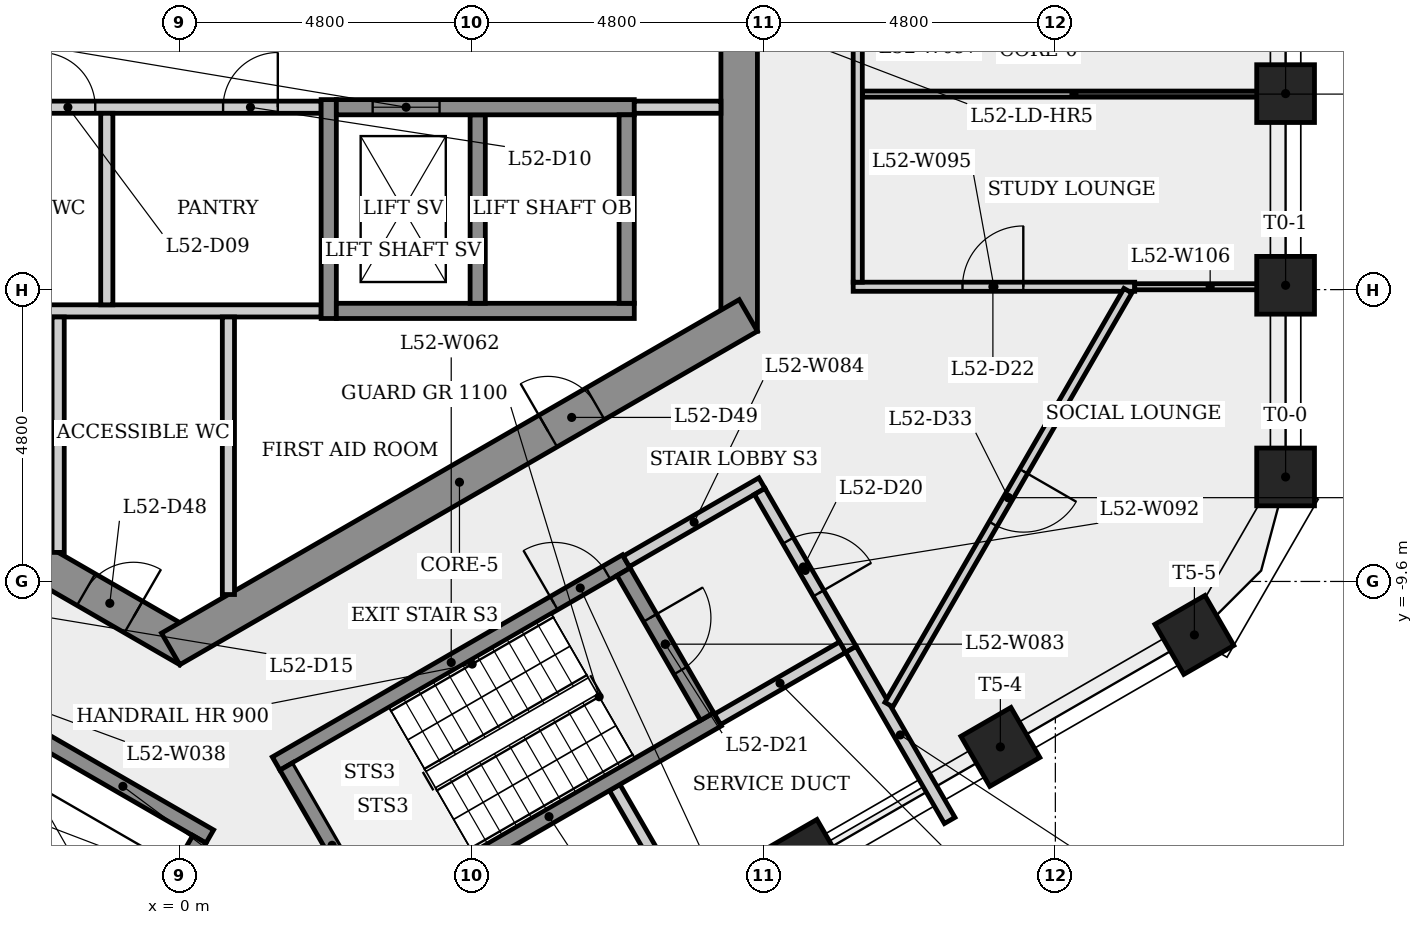
"""IFC4 building model, lengths in metres.
Left out: names, types, materials, properties, quantities, classifications, styles, units other than length and angle.
Written with IfcOpenShell. Run it as: python <this file> out.ifc"""

import sys

from ifc_helpers import new_model, si_unit, direction, frame, frame_2d, origin, origin_2d, place, context, subcontext, project, spatial, rectangle, extrude, element, fill, save


model = new_model("IFC4")
c1 = context("Model", 3, precision=1e-05, world=origin(), true_north=direction((0.0, 1.0)))
c2 = subcontext(c1, "Body", "Model", "MODEL_VIEW")
j1 = project(units=[si_unit("LENGTHUNIT", "METRE"), si_unit("PLANEANGLEUNIT", "RADIAN")], contexts=[c1])
p1 = place(None, origin())
s1 = spatial("IfcSite", under=j1, at=p1, CompositionType="ELEMENT")
p2 = place(p1, origin())
s2 = spatial("IfcBuilding", under=s1, at=p2, CompositionType="ELEMENT")
p3 = place(p2, frame((0.0, 0.0, 194.7)))
s3 = spatial("IfcBuildingStorey", under=s2, at=p3, CompositionType="ELEMENT", Elevation=194.7)
p4 = place(p3, frame((9.2, -5.485, 0.0), z_axis=(0.0, 0.0, 1.0), x_axis=(0.0, 1.0, 0.0)))
e1 = element("IfcWall", 1, at=p4, inside=s3, PredefinedType="SHEAR", context=c2, shape_type="SweptSolid", body=[
    extrude(rectangle(XDim=10.97, YDim=0.6, at=frame_2d((5.485, 0.0))), origin(), (0.0, 0.0, 1.0), 4.0),
])
p5 = place(p4, frame((4.685, 0.0, 0.0)))
e2 = element("IfcOpeningElement", 2, at=p5, cuts=e1, PredefinedType="OPENING", context=c2, shape_type="SweptSolid", body=[
    extrude(rectangle(XDim=1.6, YDim=2.1, at=frame_2d((0.8, 1.05))), frame((0.0, 0.31, 0.0), z_axis=(0.0, -1.0, 0.0), x_axis=(1.0, 0.0, 0.0)), (0.0, 0.0, 1.0), 0.62),
])
p6 = place(p3, frame((-9.35, -5.225, 0.0), z_axis=(0.0, 0.0, 1.0), x_axis=(0.866023993627, -0.500002442456, 0.0)))
e3 = element("IfcWall", 3, at=p6, inside=s3, PredefinedType="SHEAR", context=c2, shape_type="SweptSolid", body=[
    extrude(rectangle(XDim=10.97, YDim=0.6, at=frame_2d((5.485, 0.0))), origin(), (0.0, 0.0, 1.0), 4.0),
])
p7 = place(p6, frame((3.891, 0.0, 0.0)))
e4 = element("IfcOpeningElement", 4, at=p7, cuts=e3, PredefinedType="OPENING", context=c2, shape_type="SweptSolid", body=[
    extrude(rectangle(XDim=0.9, YDim=2.1, at=frame_2d((0.45, 1.05))), frame((0.0, 0.31, 0.0), z_axis=(0.0, -1.0, 0.0), x_axis=(1.0, 0.0, 0.0)), (0.0, 0.0, 1.0), 0.62),
])
p8 = place(p6, frame((9.018, 0.0, 0.0)))
e5 = element("IfcOpeningElement", 5, at=p8, cuts=e3, PredefinedType="OPENING", context=c2, shape_type="SweptSolid", body=[
    extrude(rectangle(XDim=0.9, YDim=2.1, at=frame_2d((0.45, 1.05))), frame((0.0, 0.31, 0.0), z_axis=(0.0, -1.0, 0.0), x_axis=(1.0, 0.0, 0.0)), (0.0, 0.0, 1.0), 0.62),
])
p9 = place(p3, frame((-0.15, -10.71, 0.0), z_axis=(0.0, 0.0, 1.0), x_axis=(0.866023993627, 0.500002442456, 0.0)))
e6 = element("IfcWall", 6, at=p9, inside=s3, PredefinedType="SHEAR", context=c2, shape_type="SweptSolid", body=[
    extrude(rectangle(XDim=10.97, YDim=0.6, at=frame_2d((5.485, 0.0))), origin(), (0.0, 0.0, 1.0), 4.0),
])
p10 = place(p9, frame((7.166, 0.0, 0.0)))
e7 = element("IfcOpeningElement", 7, at=p10, cuts=e6, PredefinedType="OPENING", context=c2, shape_type="SweptSolid", body=[
    extrude(rectangle(XDim=0.9, YDim=2.1, at=frame_2d((0.45, 1.05))), frame((0.0, 0.31, 0.0), z_axis=(0.0, -1.0, 0.0), x_axis=(1.0, 0.0, 0.0)), (0.0, 0.0, 1.0), 0.62),
])
for number, where, z_axis, x_axis in (
    (8, (18.187, -7.881, 0.0), (0.0, 0.0, 1.0), (1.0, 0.0, 0.0)),
    (9, (18.187, -4.729, 0.0), (0.0, 0.0, 1.0), (1.0, 0.0, 0.0)),
    (10, (18.187, -1.576, 0.0), (0.0, 0.0, 1.0), (1.0, 0.0, 0.0)),
    (11, (10.305, -14.164, 0.0), (0.0, 0.0, 1.0), (0.5, -0.866, 0.0)),
    (12, (13.496, -12.322, 0.0), (0.0, 0.0, 1.0), (0.5, -0.866, 0.0)),
    (13, (16.687, -10.479, 0.0), (0.0, 0.0, 1.0), (0.5, -0.866, 0.0)),
):
    element("IfcColumn", number, at=place(p3, frame(where, z_axis=z_axis, x_axis=x_axis)), inside=s3, PredefinedType="COLUMN", context=c2, shape_type="SweptSolid", body=[
        extrude(rectangle(XDim=0.95, YDim=0.95, at=origin_2d()), origin(), (0.0, 0.0, 1.0), 4.0),
    ])
p11 = place(p3, frame((-8.88, -5.15, 0.0), z_axis=(0.0, 0.0, 1.0), x_axis=(1.0, 0.0, 0.0)))
e14 = element("IfcWall", 14, at=p11, inside=s3, PredefinedType="PARTITIONING", context=c2, shape_type="SweptSolid", body=[
    extrude(rectangle(XDim=11.205, YDim=0.2, at=frame_2d((5.603, 0.0))), origin(), (0.0, 0.0, 1.0), 3.65),
])
p12 = place(p3, frame((-8.9, -1.8, 0.0), z_axis=(0.0, 0.0, 1.0), x_axis=(1.0, 0.0, 0.0)))
e15 = element("IfcWall", 15, at=p12, inside=s3, PredefinedType="PARTITIONING", context=c2, shape_type="SweptSolid", body=[
    extrude(rectangle(XDim=11.225, YDim=0.2, at=frame_2d((5.613, 0.0))), origin(), (0.0, 0.0, 1.0), 3.65),
])
p13 = place(p12, frame((2.16, 0.0, 0.0)))
e16 = element("IfcOpeningElement", 16, at=p13, cuts=e15, PredefinedType="OPENING", context=c2, shape_type="SweptSolid", body=[
    extrude(rectangle(XDim=0.9, YDim=2.1, at=frame_2d((0.45, 1.05))), frame((0.0, 0.11, 0.0), z_axis=(0.0, -1.0, 0.0), x_axis=(1.0, 0.0, 0.0)), (0.0, 0.0, 1.0), 0.22),
])
p14 = place(p12, frame((6.61, 0.0, 0.0)))
e17 = element("IfcOpeningElement", 17, at=p14, cuts=e15, PredefinedType="OPENING", context=c2, shape_type="SweptSolid", body=[
    extrude(rectangle(XDim=0.9, YDim=2.1, at=frame_2d((0.45, 1.05))), frame((0.0, 0.11, 0.0), z_axis=(0.0, -1.0, 0.0), x_axis=(1.0, 0.0, 0.0)), (0.0, 0.0, 1.0), 0.22),
])
p15 = place(p12, frame((9.613, 0.0, 0.0)))
e18 = element("IfcOpeningElement", 18, at=p15, cuts=e15, PredefinedType="OPENING", context=c2, shape_type="SweptSolid", body=[
    extrude(rectangle(XDim=0.9, YDim=2.1, at=frame_2d((0.45, 1.05))), frame((0.0, 0.11, 0.0), z_axis=(0.0, -1.0, 0.0), x_axis=(1.0, 0.0, 0.0)), (0.0, 0.0, 1.0), 0.22),
])
p16 = place(p3, frame((-2.364, -12.145, 0.0), z_axis=(0.0, 0.0, 1.0), x_axis=(0.866040211805, -0.499974350878, 0.0)))
e19 = element("IfcWall", 19, at=p16, inside=s3, PredefinedType="SHEAR", context=c2, shape_type="SweptSolid", body=[
    extrude(rectangle(XDim=3.3, YDim=0.25, at=frame_2d((1.65, 0.0))), origin(), (0.0, 0.0, 1.0), 3.65),
])
p17 = place(p3, frame((-2.0, -5.25, 0.0), z_axis=(0.0, 0.0, 1.0), x_axis=(0.0, -1.0, 0.0)))
e20 = element("IfcWall", 20, at=p17, inside=s3, PredefinedType="PARTITIONING", context=c2, shape_type="SweptSolid", body=[
    extrude(rectangle(XDim=3.872, YDim=0.2, at=frame_2d((1.936, 0.0))), origin(), (0.0, 0.0, 1.0), 3.65),
])
p18 = place(p3, frame((-1.2, -1.9, 0.0), z_axis=(0.0, 0.0, 1.0), x_axis=(0.0, -1.0, 0.0)))
e21 = element("IfcWall", 21, at=p18, inside=s3, PredefinedType="PARTITIONING", context=c2, shape_type="SweptSolid", body=[
    extrude(rectangle(XDim=3.15, YDim=0.2, at=frame_2d((1.575, 0.0))), origin(), (0.0, 0.0, 1.0), 3.65),
])
p19 = place(p3, frame((0.323, -13.841, 0.0), z_axis=(0.0, 0.0, 1.0), x_axis=(-0.500033620833, -0.866005991917, 0.0)))
e22 = element("IfcWall", 22, at=p19, inside=s3, PredefinedType="SHEAR", context=c2, shape_type="SweptSolid", body=[
    extrude(rectangle(XDim=2.468, YDim=0.25, at=frame_2d((1.234, 0.0))), origin(), (0.0, 0.0, 1.0), 4.0),
])
p20 = place(p3, frame((0.8, -5.25, 0.0), z_axis=(0.0, 0.0, 1.0), x_axis=(0.0, -1.0, 0.0)))
e23 = element("IfcWall", 23, at=p20, inside=s3, PredefinedType="PARTITIONING", context=c2, shape_type="SweptSolid", body=[
    extrude(rectangle(XDim=4.565, YDim=0.2, at=frame_2d((2.282, 0.0))), origin(), (0.0, 0.0, 1.0), 3.65),
])
p21 = place(p3, frame((1.585, -12.595, 0.0), z_axis=(0.0, 0.0, 1.0), x_axis=(0.866036417653, 0.499980922934, 0.0)))
e24 = element("IfcWall", 24, at=p21, inside=s3, PredefinedType="SHEAR", context=c2, shape_type="SweptSolid", body=[
    extrude(rectangle(XDim=6.65, YDim=0.25, at=frame_2d((3.325, 0.0))), origin(), (0.0, 0.0, 1.0), 3.65),
])
p22 = place(p21, frame((5.275, 0.0, 0.0)))
e25 = element("IfcOpeningElement", 25, at=p22, cuts=e24, PredefinedType="OPENING", context=c2, shape_type="SweptSolid", body=[
    extrude(rectangle(XDim=1.0, YDim=2.1, at=frame_2d((0.5, 1.05))), frame((0.0, 0.135, 0.0), z_axis=(0.0, -1.0, 0.0), x_axis=(1.0, 0.0, 0.0)), (0.0, 0.0, 1.0), 0.27),
])
p23 = place(p3, frame((2.45, -5.275, 0.0), z_axis=(0.0, 0.0, 1.0), x_axis=(0.0, 1.0, 0.0)))
e26 = element("IfcWall", 26, at=p23, inside=s3, PredefinedType="SHEAR", context=c2, shape_type="SweptSolid", body=[
    extrude(rectangle(XDim=3.6, YDim=0.25, at=frame_2d((1.8, 0.0))), origin(), (0.0, 0.0, 1.0), 3.65),
])
p24 = place(p3, frame((3.256, -15.239, 0.0), z_axis=(0.0, 0.0, 1.0), x_axis=(-0.50002537861, 0.866010750942, 0.0)))
e27 = element("IfcWall", 27, at=p24, inside=s3, PredefinedType="SHEAR", context=c2, shape_type="SweptSolid", body=[
    extrude(rectangle(XDim=3.0, YDim=0.25, at=frame_2d((1.5, 0.0))), origin(), (0.0, 0.0, 1.0), 3.65),
])
p25 = place(p3, frame((2.575, -5.15, 0.0), z_axis=(0.0, 0.0, 1.0), x_axis=(1.0, 0.0, 0.0)))
e28 = element("IfcWall", 28, at=p25, inside=s3, PredefinedType="SHEAR", context=c2, shape_type="SweptSolid", body=[
    extrude(rectangle(XDim=4.9, YDim=0.25, at=frame_2d((2.45, 0.0))), origin(), (0.0, 0.0, 1.0), 3.65),
])
p26 = place(p3, frame((4.9, -1.925, 0.0), z_axis=(0.0, 0.0, 1.0), x_axis=(0.0, -1.0, 0.0)))
e29 = element("IfcWall", 29, at=p26, inside=s3, PredefinedType="SHEAR", context=c2, shape_type="SweptSolid", body=[
    extrude(rectangle(XDim=3.1, YDim=0.25, at=frame_2d((1.55, 0.0))), origin(), (0.0, 0.0, 1.0), 4.0),
])
p27 = place(p3, frame((2.575, -1.8, 0.0), z_axis=(0.0, 0.0, 1.0), x_axis=(1.0, 0.0, 0.0)))
e30 = element("IfcWall", 30, at=p27, inside=s3, PredefinedType="SHEAR", context=c2, shape_type="SweptSolid", body=[
    extrude(rectangle(XDim=4.9, YDim=0.25, at=frame_2d((2.45, 0.0))), origin(), (0.0, 0.0, 1.0), 3.65),
])
p28 = place(p27, frame((0.597, 0.0, 0.0)))
e31 = element("IfcOpeningElement", 31, at=p28, cuts=e30, PredefinedType="OPENING", context=c2, shape_type="SweptSolid", body=[
    extrude(rectangle(XDim=1.1, YDim=2.1, at=frame_2d((0.55, 1.05))), frame((0.0, 0.135, 0.0), z_axis=(0.0, -1.0, 0.0), x_axis=(1.0, 0.0, 0.0)), (0.0, 0.0, 1.0), 0.27),
])
p29 = place(p3, frame((7.153, -12.989, 0.0), z_axis=(0.0, 0.0, 1.0), x_axis=(0.500015196914, -0.866016629664, 0.0)))
e32 = element("IfcWall", 32, at=p29, inside=s3, PredefinedType="PLUMBINGWALL", context=c2, shape_type="SweptSolid", body=[
    extrude(rectangle(XDim=3.225, YDim=0.2, at=frame_2d((1.612, 0.0))), origin(), (0.0, 0.0, 1.0), 3.65),
])
p30 = place(p3, frame((3.301, -15.068, 0.0), z_axis=(0.0, 0.0, 1.0), x_axis=(0.866035036182, 0.499983315828, 0.0)))
e33 = element("IfcWall", 33, at=p30, inside=s3, PredefinedType="SHEAR", context=c2, shape_type="SweptSolid", body=[
    extrude(rectangle(XDim=6.4, YDim=0.25, at=frame_2d((3.2, 0.0))), origin(), (0.0, 0.0, 1.0), 3.65),
])
p31 = place(p3, frame((7.298, -9.441, 0.0), z_axis=(0.0, 0.0, 1.0), x_axis=(0.500034990121, -0.866005201286, 0.0)))
e34 = element("IfcWall", 34, at=p31, inside=s3, PredefinedType="SHEAR", context=c2, shape_type="SweptSolid", body=[
    extrude(rectangle(XDim=2.75, YDim=0.25, at=frame_2d((1.375, 0.0))), origin(), (0.0, 0.0, 1.0), 3.65),
])
p32 = place(p31, frame((0.875, 0.0, 0.0)))
e35 = element("IfcOpeningElement", 35, at=p32, cuts=e34, PredefinedType="OPENING", context=c2, shape_type="SweptSolid", body=[
    extrude(rectangle(XDim=1.0, YDim=2.1, at=frame_2d((0.5, 1.05))), frame((0.0, 0.135, 0.0), z_axis=(0.0, -1.0, 0.0), x_axis=(1.0, 0.0, 0.0)), (0.0, 0.0, 1.0), 0.27),
])
p33 = place(p3, frame((7.344, -9.27, 0.0), z_axis=(0.0, 0.0, 1.0), x_axis=(0.866005588531, 0.500034319456, 0.0)))
e36 = element("IfcWall", 36, at=p33, inside=s3, PredefinedType="PARTITIONING", context=c2, shape_type="SweptSolid", body=[
    extrude(rectangle(XDim=2.575, YDim=0.2, at=frame_2d((1.288, 0.0))), origin(), (0.0, 0.0, 1.0), 3.65),
])
p34 = place(p3, frame((7.35, -1.925, 0.0), z_axis=(0.0, 0.0, 1.0), x_axis=(0.0, -1.0, 0.0)))
e37 = element("IfcWall", 37, at=p34, inside=s3, PredefinedType="SHEAR", context=c2, shape_type="SweptSolid", body=[
    extrude(rectangle(XDim=3.1, YDim=0.25, at=frame_2d((1.55, 0.0))), origin(), (0.0, 0.0, 1.0), 4.0),
])
p35 = place(p3, frame((8.9, -1.8, 0.0), z_axis=(0.0, 0.0, 1.0), x_axis=(-1.0, 0.0, 0.0)))
e38 = element("IfcWall", 38, at=p35, inside=s3, PredefinedType="PARTITIONING", context=c2, shape_type="SweptSolid", body=[
    extrude(rectangle(XDim=1.425, YDim=0.2, at=frame_2d((0.712, 0.0))), origin(), (0.0, 0.0, 1.0), 3.65),
])
p36 = place(p3, frame((9.537, -8.119, 0.0), z_axis=(0.0, 0.0, 1.0), x_axis=(0.499990139034, -0.866031096941, 0.0)))
e39 = element("IfcWall", 39, at=p36, inside=s3, PredefinedType="PARTITIONING", context=c2, shape_type="SweptSolid", body=[
    extrude(rectangle(XDim=3.0, YDim=0.2, at=frame_2d((1.5, 0.0))), origin(), (0.0, 0.0, 1.0), 3.65),
])
p37 = place(p36, frame((0.935, 0.0, 0.0)))
e40 = element("IfcOpeningElement", 40, at=p37, cuts=e39, PredefinedType="OPENING", context=c2, shape_type="SweptSolid", body=[
    extrude(rectangle(XDim=1.0, YDim=2.1, at=frame_2d((0.5, 1.05))), frame((0.0, 0.11, 0.0), z_axis=(0.0, -1.0, 0.0), x_axis=(1.0, 0.0, 0.0)), (0.0, 0.0, 1.0), 0.22),
])
p38 = place(p3, frame((10.901, -10.681, 0.0), z_axis=(0.0, 0.0, 1.0), x_axis=(-0.866007538022, -0.500030943131, 0.0)))
e41 = element("IfcWall", 41, at=p38, inside=s3, PredefinedType="PLUMBINGWALL", context=c2, shape_type="SweptSolid", body=[
    extrude(rectangle(XDim=2.375, YDim=0.2, at=frame_2d((1.188, 0.0))), origin(), (0.0, 0.0, 1.0), 3.65),
])
p39 = place(p3, frame((11.037, -10.717, 0.0), z_axis=(0.0, 0.0, 1.0), x_axis=(0.500025966412, -0.86601041155, 0.0)))
e42 = element("IfcWall", 42, at=p39, inside=s3, PredefinedType="PLUMBINGWALL", context=c2, shape_type="SweptSolid", body=[
    extrude(rectangle(XDim=3.249, YDim=0.2, at=frame_2d((1.625, 0.0))), origin(), (0.0, 0.0, 1.0), 3.65),
])
p40 = place(p3, frame((11.075, -4.753, 0.0), z_axis=(0.0, 0.0, 1.0), x_axis=(1.0, 0.0, 0.0)))
e43 = element("IfcWall", 43, at=p40, inside=s3, PredefinedType="PARTITIONING", context=c2, shape_type="SweptSolid", body=[
    extrude(rectangle(XDim=4.63, YDim=0.15, at=frame_2d((2.315, 0.0))), origin(), (0.0, 0.0, 1.0), 3.65),
])
p41 = place(p40, frame((1.798, 0.0, 0.0)))
e44 = element("IfcOpeningElement", 44, at=p41, cuts=e43, PredefinedType="OPENING", context=c2, shape_type="SweptSolid", body=[
    extrude(rectangle(XDim=1.0, YDim=2.1, at=frame_2d((0.5, 1.05))), frame((0.0, 0.085, 0.0), z_axis=(0.0, -1.0, 0.0), x_axis=(1.0, 0.0, 0.0)), (0.0, 0.0, 1.0), 0.17),
])
p42 = place(p3, frame((11.225, -1.584, 0.0), z_axis=(0.0, 0.0, 1.0), x_axis=(1.0, 0.0, 0.0)))
e45 = element("IfcWall", 45, at=p42, inside=s3, PredefinedType="PARTITIONING", context=c2, shape_type="SweptSolid", body=[
    extrude(rectangle(XDim=6.961, YDim=0.1, at=frame_2d((3.481, 0.0))), origin(), (0.0, 0.0, 1.0), 3.65),
])
p43 = place(p3, frame((11.15, -4.678, 0.0), z_axis=(0.0, 0.0, 1.0), x_axis=(0.0, 1.0, 0.0)))
e46 = element("IfcWall", 46, at=p43, inside=s3, PredefinedType="PARTITIONING", context=c2, shape_type="SweptSolid", body=[
    extrude(rectangle(XDim=9.506, YDim=0.15, at=frame_2d((4.753, 0.0))), origin(), (0.0, 0.0, 1.0), 3.65),
])
p44 = place(p43, frame((4.178, 0.0, 0.0)))
e47 = element("IfcOpeningElement", 47, at=p44, cuts=e46, PredefinedType="OPENING", context=c2, shape_type="SweptSolid", body=[
    extrude(rectangle(XDim=1.0, YDim=2.1, at=frame_2d((0.5, 1.05))), frame((0.0, 0.085, 0.0), z_axis=(0.0, -1.0, 0.0), x_axis=(1.0, 0.0, 0.0)), (0.0, 0.0, 1.0), 0.17),
])
p45 = place(p3, frame((15.593, -4.818, 0.0), z_axis=(0.0, 0.0, 1.0), x_axis=(-0.500000242082, -0.866025264018, 0.0)))
e48 = element("IfcWall", 48, at=p45, inside=s3, PredefinedType="PARTITIONING", context=c2, shape_type="SweptSolid", body=[
    extrude(rectangle(XDim=7.861, YDim=0.15, at=frame_2d((3.931, 0.0))), origin(), (0.0, 0.0, 1.0), 3.65),
])
p46 = place(p45, frame((3.431, 0.0, 0.0)))
e49 = element("IfcOpeningElement", 49, at=p46, cuts=e48, PredefinedType="OPENING", context=c2, shape_type="SweptSolid", body=[
    extrude(rectangle(XDim=1.0, YDim=2.1, at=frame_2d((0.5, 1.05))), frame((0.0, 0.085, 0.0), z_axis=(0.0, -1.0, 0.0), x_axis=(1.0, 0.0, 0.0)), (0.0, 0.0, 1.0), 0.17),
])
p47 = place(p3, frame((18.187, -4.753, 0.0), z_axis=(0.0, 0.0, 1.0), x_axis=(-1.0, 0.0, 0.0)))
e50 = element("IfcWall", 50, at=p47, inside=s3, PredefinedType="PARTITIONING", context=c2, shape_type="SweptSolid", body=[
    extrude(rectangle(XDim=2.481, YDim=0.1, at=frame_2d((1.241, 0.0))), origin(), (0.0, 0.0, 1.0), 3.65),
])
p48 = place(p28, origin())
e51 = element("IfcDoor", 51, at=p48, inside=s3, OperationType="SLIDING_TO_LEFT", PredefinedType="DOOR", context=c2, shape_type="SweptSolid", body=[
    extrude(rectangle(XDim=1.1, YDim=2.1, at=frame_2d((0.55, 1.05))), frame((0.0, 0.025, 0.0), z_axis=(0.0, -1.0, 0.0), x_axis=(1.0, 0.0, 0.0)), (0.0, 0.0, 1.0), 0.05),
])
fill(e31, e51)
p49 = place(p14, origin())
e52 = element("IfcDoor", 52, at=p49, inside=s3, OperationType="SINGLE_SWING_LEFT", PredefinedType="DOOR", context=c2, shape_type="SweptSolid", body=[
    extrude(rectangle(XDim=0.9, YDim=2.1, at=frame_2d((0.45, 1.05))), frame((0.0, 0.025, 0.0), z_axis=(0.0, -1.0, 0.0), x_axis=(1.0, 0.0, 0.0)), (0.0, 0.0, 1.0), 0.05),
])
fill(e17, e52)
p50 = place(p15, origin())
e53 = element("IfcDoor", 53, at=p50, inside=s3, OperationType="SINGLE_SWING_RIGHT", PredefinedType="DOOR", context=c2, shape_type="SweptSolid", body=[
    extrude(rectangle(XDim=0.9, YDim=2.1, at=frame_2d((0.45, 1.05))), frame((0.0, 0.025, 0.0), z_axis=(0.0, -1.0, 0.0), x_axis=(1.0, 0.0, 0.0)), (0.0, 0.0, 1.0), 0.05),
])
fill(e18, e53)
p51 = place(p22, origin())
e54 = element("IfcDoor", 54, at=p51, inside=s3, OperationType="SINGLE_SWING_LEFT", PredefinedType="DOOR", context=c2, shape_type="SweptSolid", body=[
    extrude(rectangle(XDim=1.0, YDim=2.1, at=frame_2d((0.5, 1.05))), frame((0.0, 0.025, 0.0), z_axis=(0.0, -1.0, 0.0), x_axis=(1.0, 0.0, 0.0)), (0.0, 0.0, 1.0), 0.05),
])
fill(e25, e54)
p52 = place(p37, origin())
e55 = element("IfcDoor", 55, at=p52, inside=s3, OperationType="SINGLE_SWING_RIGHT", PredefinedType="DOOR", context=c2, shape_type="SweptSolid", body=[
    extrude(rectangle(XDim=1.0, YDim=2.1, at=frame_2d((0.5, 1.05))), frame((0.0, 0.025, 0.0), z_axis=(0.0, -1.0, 0.0), x_axis=(1.0, 0.0, 0.0)), (0.0, 0.0, 1.0), 0.05),
])
fill(e40, e55)
p53 = place(p32, origin())
e56 = element("IfcDoor", 56, at=p53, inside=s3, OperationType="SINGLE_SWING_LEFT", PredefinedType="DOOR", context=c2, shape_type="SweptSolid", body=[
    extrude(rectangle(XDim=1.0, YDim=2.1, at=frame_2d((0.5, 1.05))), frame((0.0, 0.025, 0.0), z_axis=(0.0, -1.0, 0.0), x_axis=(1.0, 0.0, 0.0)), (0.0, 0.0, 1.0), 0.05),
])
fill(e35, e56)
p54 = place(p41, origin())
e57 = element("IfcDoor", 57, at=p54, inside=s3, OperationType="SINGLE_SWING_RIGHT", PredefinedType="DOOR", context=c2, shape_type="SweptSolid", body=[
    extrude(rectangle(XDim=1.0, YDim=2.1, at=frame_2d((0.5, 1.05))), frame((0.0, 0.025, 0.0), z_axis=(0.0, -1.0, 0.0), x_axis=(1.0, 0.0, 0.0)), (0.0, 0.0, 1.0), 0.05),
])
fill(e44, e57)
p55 = place(p46, origin())
e58 = element("IfcDoor", 58, at=p55, inside=s3, OperationType="SINGLE_SWING_LEFT", PredefinedType="DOOR", context=c2, shape_type="SweptSolid", body=[
    extrude(rectangle(XDim=1.0, YDim=2.1, at=frame_2d((0.5, 1.05))), frame((0.0, 0.025, 0.0), z_axis=(0.0, -1.0, 0.0), x_axis=(1.0, 0.0, 0.0)), (0.0, 0.0, 1.0), 0.05),
])
fill(e49, e58)
p56 = place(p8, origin())
e59 = element("IfcDoor", 59, at=p56, inside=s3, OperationType="SINGLE_SWING_RIGHT", PredefinedType="DOOR", context=c2, shape_type="SweptSolid", body=[
    extrude(rectangle(XDim=0.9, YDim=2.1, at=frame_2d((0.45, 1.05))), frame((0.0, 0.025, 0.0), z_axis=(0.0, -1.0, 0.0), x_axis=(1.0, 0.0, 0.0)), (0.0, 0.0, 1.0), 0.05),
])
fill(e5, e59)
p57 = place(p10, origin())
e60 = element("IfcDoor", 60, at=p57, inside=s3, OperationType="SINGLE_SWING_LEFT", PredefinedType="DOOR", context=c2, shape_type="SweptSolid", body=[
    extrude(rectangle(XDim=0.9, YDim=2.1, at=frame_2d((0.45, 1.05))), frame((0.0, 0.025, 0.0), z_axis=(0.0, -1.0, 0.0), x_axis=(1.0, 0.0, 0.0)), (0.0, 0.0, 1.0), 0.05),
])
fill(e7, e60)
save(model, sys.argv[1])
